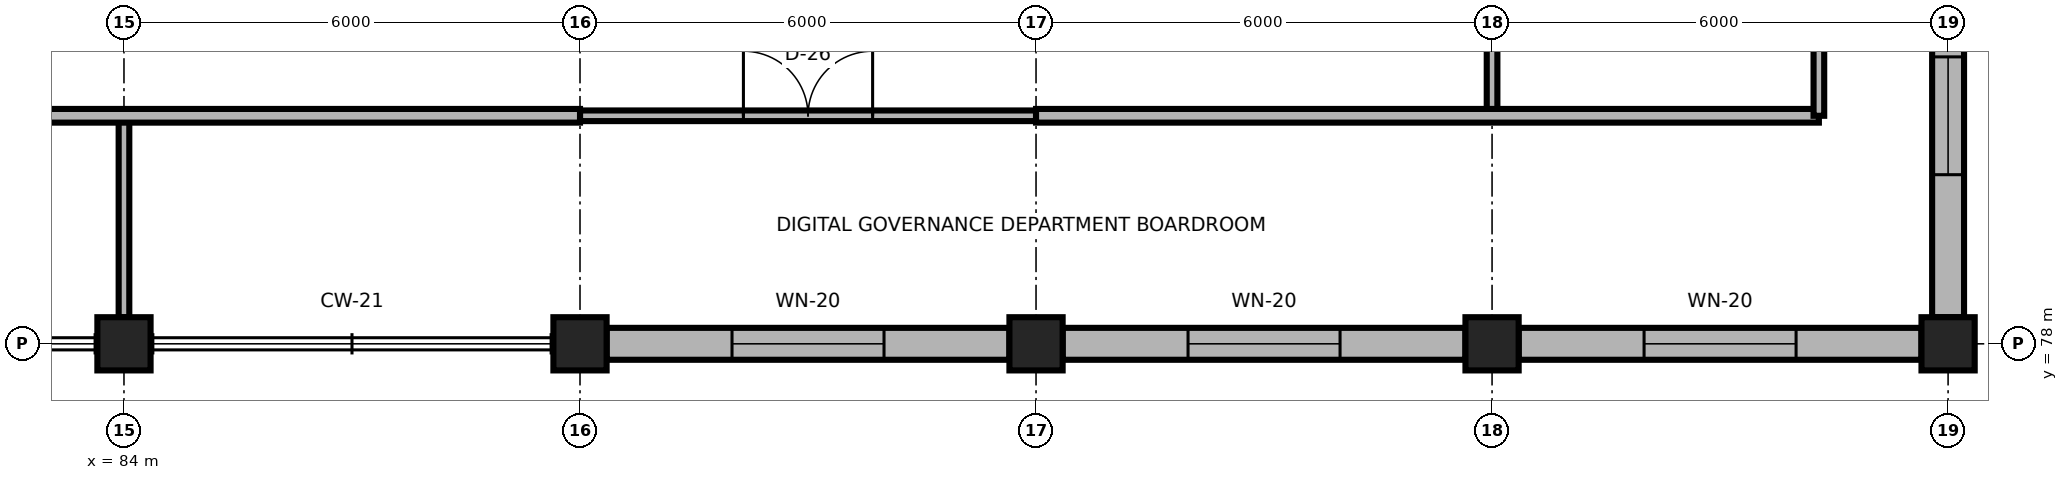
"""IFC4 building model, lengths in metres.
Left out: names, types, materials, properties, quantities, classifications, styles, units other than length and angle.
Written with IfcOpenShell. Run it as: python <this file> out.ifc"""

import sys

from ifc_helpers import new_model, si_unit, direction, frame, frame_2d, origin, origin_2d, place, context, subcontext, project, spatial, rectangle, extrude, element, fill, save


model = new_model("IFC4")
c1 = context("Model", 3, precision=1e-05, world=origin(), true_north=direction((0.0, 1.0)))
c2 = subcontext(c1, "Body", "Model", "MODEL_VIEW")
j1 = project(units=[si_unit("LENGTHUNIT", "METRE"), si_unit("PLANEANGLEUNIT", "RADIAN")], contexts=[c1])
p1 = place(None, origin())
s1 = spatial("IfcSite", under=j1, at=p1, CompositionType="ELEMENT")
p2 = place(p1, origin())
s2 = spatial("IfcBuilding", under=s1, at=p2, CompositionType="ELEMENT")
p3 = place(p2, frame((0.0, 0.0, 56.1)))
s3 = spatial("IfcBuildingStorey", under=s2, at=p3, CompositionType="ELEMENT", Elevation=56.1)
for number, where, z_axis, x_axis in (
    (1, (84.0, 78.0, 0.0), (0.0, 0.0, 1.0), (1.0, 0.0, 0.0)),
    (2, (90.0, 78.0, 0.0), (0.0, 0.0, 1.0), (1.0, 0.0, 0.0)),
    (3, (96.0, 78.0, 0.0), (0.0, 0.0, 1.0), (1.0, 0.0, 0.0)),
    (4, (102.0, 78.0, 0.0), (0.0, 0.0, 1.0), (1.0, 0.0, 0.0)),
    (5, (108.0, 78.0, 0.0), (0.0, 0.0, 1.0), (1.0, 0.0, 0.0)),
):
    element("IfcColumn", number, at=place(p3, frame(where, z_axis=z_axis, x_axis=x_axis)), inside=s3, PredefinedType="COLUMN", context=c2, shape_type="SweptSolid", body=[
        extrude(rectangle(XDim=0.7, YDim=0.7, at=origin_2d()), origin(), (0.0, 0.0, 1.0), 3.9),
    ])
p4 = place(p3, frame((90.35, 78.0, 0.0), z_axis=(0.0, 0.0, 1.0), x_axis=(1.0, 0.0, 0.0)))
e6 = element("IfcWall", 6, at=p4, inside=s3, PredefinedType="SOLIDWALL", context=c2, shape_type="SweptSolid", body=[
    extrude(rectangle(XDim=5.3, YDim=0.42, at=frame_2d((2.65, 0.0))), origin(), (0.0, 0.0, 1.0), 3.32),
])
p5 = place(p4, frame((1.65, 0.0, 0.85)))
e7 = element("IfcOpeningElement", 7, at=p5, cuts=e6, PredefinedType="OPENING", context=c2, shape_type="SweptSolid", body=[
    extrude(rectangle(XDim=2.0, YDim=1.95, at=frame_2d((1.0, 0.975))), frame((0.0, 0.225, 0.0), z_axis=(0.0, -1.0, 0.0), x_axis=(1.0, 0.0, 0.0)), (0.0, 0.0, 1.0), 0.45),
])
p6 = place(p3, frame((96.35, 78.0, 0.0), z_axis=(0.0, 0.0, 1.0), x_axis=(1.0, 0.0, 0.0)))
e8 = element("IfcWall", 8, at=p6, inside=s3, PredefinedType="SOLIDWALL", context=c2, shape_type="SweptSolid", body=[
    extrude(rectangle(XDim=5.3, YDim=0.42, at=frame_2d((2.65, 0.0))), origin(), (0.0, 0.0, 1.0), 3.32),
])
p7 = place(p6, frame((1.65, 0.0, 0.85)))
e9 = element("IfcOpeningElement", 9, at=p7, cuts=e8, PredefinedType="OPENING", context=c2, shape_type="SweptSolid", body=[
    extrude(rectangle(XDim=2.0, YDim=1.95, at=frame_2d((1.0, 0.975))), frame((0.0, 0.225, 0.0), z_axis=(0.0, -1.0, 0.0), x_axis=(1.0, 0.0, 0.0)), (0.0, 0.0, 1.0), 0.45),
])
p8 = place(p3, frame((102.35, 78.0, 0.0), z_axis=(0.0, 0.0, 1.0), x_axis=(1.0, 0.0, 0.0)))
e10 = element("IfcWall", 10, at=p8, inside=s3, PredefinedType="SOLIDWALL", context=c2, shape_type="SweptSolid", body=[
    extrude(rectangle(XDim=5.3, YDim=0.42, at=frame_2d((2.65, 0.0))), origin(), (0.0, 0.0, 1.0), 3.32),
])
p9 = place(p8, frame((1.65, 0.0, 0.85)))
e11 = element("IfcOpeningElement", 11, at=p9, cuts=e10, PredefinedType="OPENING", context=c2, shape_type="SweptSolid", body=[
    extrude(rectangle(XDim=2.0, YDim=1.95, at=frame_2d((1.0, 0.975))), frame((0.0, 0.225, 0.0), z_axis=(0.0, -1.0, 0.0), x_axis=(1.0, 0.0, 0.0)), (0.0, 0.0, 1.0), 0.45),
])
p10 = place(p3, frame((108.0, 78.35, 0.0), z_axis=(0.0, 0.0, 1.0), x_axis=(0.0, 1.0, 0.0)))
e12 = element("IfcWall", 12, at=p10, inside=s3, PredefinedType="SOLIDWALL", context=c2, shape_type="SweptSolid", body=[
    extrude(rectangle(XDim=5.3, YDim=0.42, at=frame_2d((2.65, 0.0))), origin(), (0.0, 0.0, 1.0), 3.32),
])
p11 = place(p10, frame((1.875, 0.0, 0.85)))
e13 = element("IfcOpeningElement", 13, at=p11, cuts=e12, PredefinedType="OPENING", context=c2, shape_type="SweptSolid", body=[
    extrude(rectangle(XDim=1.55, YDim=1.9, at=frame_2d((0.775, 0.95))), frame((0.0, 0.225, 0.0), z_axis=(0.0, -1.0, 0.0), x_axis=(1.0, 0.0, 0.0)), (0.0, 0.0, 1.0), 0.45),
])
p12 = place(p3, frame((90.0, 81.0, 0.0), z_axis=(0.0, 0.0, 1.0), x_axis=(1.0, 0.0, 0.0)))
e14 = element("IfcWall", 14, at=p12, inside=s3, PredefinedType="PARTITIONING", context=c2, shape_type="SweptSolid", body=[
    extrude(rectangle(XDim=6.0, YDim=0.14, at=frame_2d((3.0, 0.0))), origin(), (0.0, 0.0, 1.0), 3.74),
])
p13 = place(p12, frame((2.15, 0.0, 0.0)))
e15 = element("IfcOpeningElement", 15, at=p13, cuts=e14, PredefinedType="OPENING", context=c2, shape_type="SweptSolid", body=[
    extrude(rectangle(XDim=1.7, YDim=2.45, at=frame_2d((0.85, 1.225))), frame((0.0, 0.085, 0.0), z_axis=(0.0, -1.0, 0.0), x_axis=(1.0, 0.0, 0.0)), (0.0, 0.0, 1.0), 0.17),
])
p14 = place(p3, frame((102.0, 81.05, 0.0), z_axis=(0.0, 0.0, 1.0), x_axis=(0.0, 1.0, 0.0)))
e16 = element("IfcWall", 16, at=p14, inside=s3, PredefinedType="PARTITIONING", context=c2, shape_type="SweptSolid", body=[
    extrude(rectangle(XDim=2.9, YDim=0.14, at=frame_2d((1.45, 0.0))), origin(), (0.0, 0.0, 1.0), 3.449),
])
p15 = place(p14, frame((0.925, 0.0, 0.0)))
e17 = element("IfcOpeningElement", 17, at=p15, cuts=e16, PredefinedType="OPENING", context=c2, shape_type="SweptSolid", body=[
    extrude(rectangle(XDim=1.05, YDim=2.25, at=frame_2d((0.525, 1.125))), frame((0.0, 0.085, 0.0), z_axis=(0.0, -1.0, 0.0), x_axis=(1.0, 0.0, 0.0)), (0.0, 0.0, 1.0), 0.17),
])
p16 = place(p3, frame((84.0, 78.35, 0.0), z_axis=(0.0, 0.0, 1.0), x_axis=(0.0, 1.0, 0.0)))
e18 = element("IfcWall", 18, at=p16, inside=s3, PredefinedType="PARTITIONING", context=c2, shape_type="SweptSolid", body=[
    extrude(rectangle(XDim=2.65, YDim=0.14, at=frame_2d((1.325, 0.0))), origin(), (0.0, 0.0, 1.0), 3.449),
])
p17 = place(p3, frame((72.0, 81.0, 0.0), z_axis=(0.0, 0.0, 1.0), x_axis=(1.0, 0.0, 0.0)))
e19 = element("IfcWall", 19, at=p17, inside=s3, PredefinedType="PARTITIONING", context=c2, shape_type="SweptSolid", body=[
    extrude(rectangle(XDim=18.0, YDim=0.18, at=frame_2d((9.0, 0.0))), origin(), (0.0, 0.0, 1.0), 3.74),
])
p18 = place(p3, frame((96.0, 81.0, 0.0), z_axis=(0.0, 0.0, 1.0), x_axis=(1.0, 0.0, 0.0)))
e20 = element("IfcWall", 20, at=p18, inside=s3, PredefinedType="PARTITIONING", context=c2, shape_type="SweptSolid", body=[
    extrude(rectangle(XDim=10.3, YDim=0.18, at=frame_2d((5.15, 0.0))), origin(), (0.0, 0.0, 1.0), 3.74),
])
p19 = place(p3, frame((106.3, 81.0, 0.0), z_axis=(0.0, 0.0, 1.0), x_axis=(0.0, 1.0, 0.0)))
e21 = element("IfcWall", 21, at=p19, inside=s3, PredefinedType="PARTITIONING", context=c2, shape_type="SweptSolid", body=[
    extrude(rectangle(XDim=1.15, YDim=0.14, at=frame_2d((0.575, 0.0))), origin(), (0.0, 0.0, 1.0), 3.74),
])
p20 = place(p5, origin())
e22 = element("IfcWindow", 22, at=p20, inside=s3, PartitioningType="SINGLE_PANEL", PredefinedType="WINDOW", context=c2, shape_type="SweptSolid", body=[
    extrude(rectangle(XDim=2.0, YDim=1.95, at=frame_2d((1.0, 0.975))), frame((0.0, 0.03, 0.0), z_axis=(0.0, -1.0, 0.0), x_axis=(1.0, 0.0, 0.0)), (0.0, 0.0, 1.0), 0.06),
])
fill(e7, e22)
p21 = place(p7, origin())
e23 = element("IfcWindow", 23, at=p21, inside=s3, PartitioningType="SINGLE_PANEL", PredefinedType="WINDOW", context=c2, shape_type="SweptSolid", body=[
    extrude(rectangle(XDim=2.0, YDim=1.95, at=frame_2d((1.0, 0.975))), frame((0.0, 0.03, 0.0), z_axis=(0.0, -1.0, 0.0), x_axis=(1.0, 0.0, 0.0)), (0.0, 0.0, 1.0), 0.06),
])
fill(e9, e23)
p22 = place(p9, origin())
e24 = element("IfcWindow", 24, at=p22, inside=s3, PartitioningType="SINGLE_PANEL", PredefinedType="WINDOW", context=c2, shape_type="SweptSolid", body=[
    extrude(rectangle(XDim=2.0, YDim=1.95, at=frame_2d((1.0, 0.975))), frame((0.0, 0.03, 0.0), z_axis=(0.0, -1.0, 0.0), x_axis=(1.0, 0.0, 0.0)), (0.0, 0.0, 1.0), 0.06),
])
fill(e11, e24)
p23 = place(p11, origin())
e25 = element("IfcWindow", 25, at=p23, inside=s3, PartitioningType="SINGLE_PANEL", PredefinedType="WINDOW", context=c2, shape_type="SweptSolid", body=[
    extrude(rectangle(XDim=1.55, YDim=1.9, at=frame_2d((0.775, 0.95))), frame((0.0, 0.03, 0.0), z_axis=(0.0, -1.0, 0.0), x_axis=(1.0, 0.0, 0.0)), (0.0, 0.0, 1.0), 0.06),
])
fill(e13, e25)
p24 = place(p13, origin())
e26 = element("IfcDoor", 26, at=p24, inside=s3, OperationType="DOUBLE_DOOR_SINGLE_SWING", PredefinedType="DOOR", context=c2, shape_type="SweptSolid", body=[
    extrude(rectangle(XDim=1.7, YDim=2.45, at=frame_2d((0.85, 1.225))), frame((0.0, 0.025, 0.0), z_axis=(0.0, -1.0, 0.0), x_axis=(1.0, 0.0, 0.0)), (0.0, 0.0, 1.0), 0.05),
])
fill(e15, e26)
save(model, sys.argv[1])
